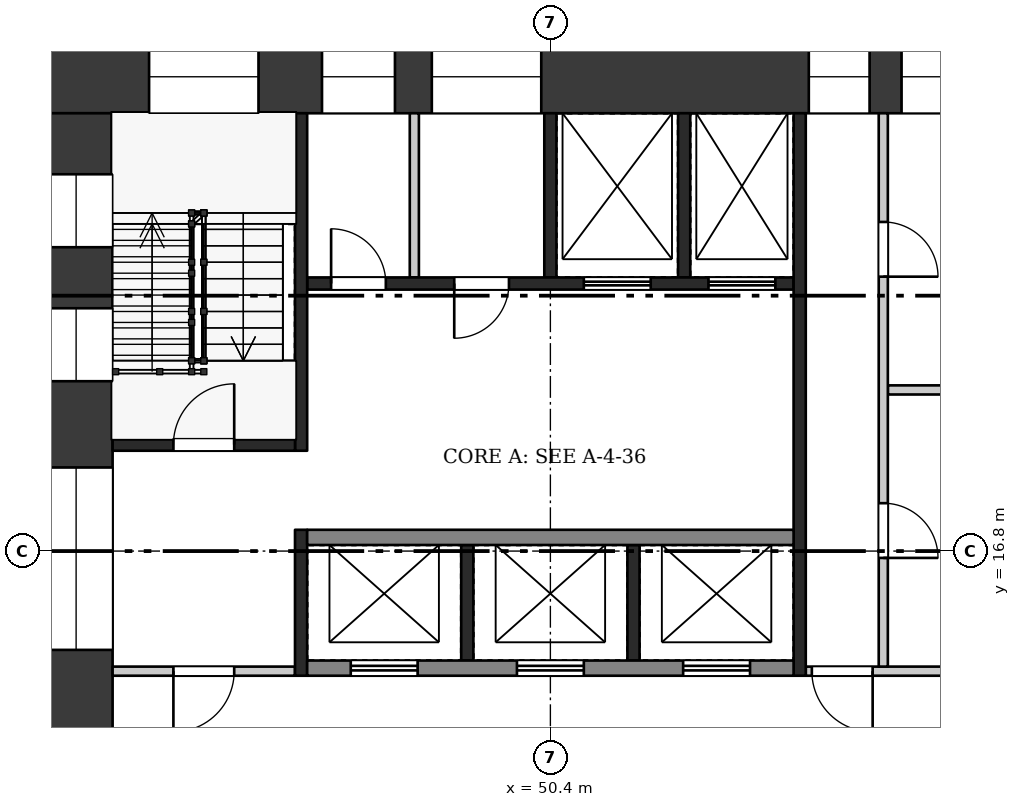
"""IFC4 building model, lengths in metres.
Left out: names, types, materials, properties, quantities, classifications, styles, units other than length and angle.
Written with IfcOpenShell. Run it as: python <this file> out.ifc"""

import sys

from ifc_helpers import new_model, si_unit, direction, frame, frame_2d, origin, origin_2d, place, context, subcontext, project, spatial, rectangle, extrude, element, fill, save


model = new_model("IFC4")
c1 = context("Model", 3, precision=1e-05, world=origin(), true_north=direction((0.0, 1.0)))
c2 = subcontext(c1, "Body", "Model", "MODEL_VIEW")
j1 = project(units=[si_unit("LENGTHUNIT", "METRE"), si_unit("PLANEANGLEUNIT", "RADIAN")], contexts=[c1])
p1 = place(None, origin())
s1 = spatial("IfcSite", under=j1, at=p1, CompositionType="ELEMENT")
p2 = place(p1, origin())
s2 = spatial("IfcBuilding", under=s1, at=p2, CompositionType="ELEMENT")
p3 = place(p2, frame((0.0, 0.0, 277.2)))
s3 = spatial("IfcBuildingStorey", under=s2, at=p3, CompositionType="ELEMENT", Elevation=277.2)
p4 = place(p3, frame((42.0, 24.6, 0.0), z_axis=(0.0, 0.0, 1.0), x_axis=(1.0, 0.0, 0.0)))
e1 = element("IfcWall", 1, at=p4, inside=s3, PredefinedType="SHEAR", context=c2, shape_type="SweptSolid", body=[
    extrude(rectangle(XDim=16.8, YDim=1.2, at=frame_2d((8.4, 0.0))), origin(), (0.0, 0.0, 1.0), 6.58),
])
p5 = place(p4, frame((1.8, 0.0, 0.5)))
e2 = element("IfcOpeningElement", 2, at=p5, cuts=e1, PredefinedType="OPENING", context=c2, shape_type="SweptSolid", body=[
    extrude(rectangle(XDim=1.8, YDim=2.4, at=frame_2d((0.9, 1.2))), frame((0.0, 0.61, 0.0), z_axis=(0.0, -1.0, 0.0), x_axis=(1.0, 0.0, 0.0)), (0.0, 0.0, 1.0), 1.22),
])
p6 = place(p4, frame((4.644, 0.0, 1.6)))
e3 = element("IfcOpeningElement", 3, at=p6, cuts=e1, PredefinedType="OPENING", context=c2, shape_type="SweptSolid", body=[
    extrude(rectangle(XDim=1.2, YDim=1.2, at=frame_2d((0.6, 0.6))), frame((0.0, 0.61, 0.0), z_axis=(0.0, -1.0, 0.0), x_axis=(1.0, 0.0, 0.0)), (0.0, 0.0, 1.0), 1.22),
])
p7 = place(p4, frame((6.45, 0.0, 1.6)))
e4 = element("IfcOpeningElement", 4, at=p7, cuts=e1, PredefinedType="OPENING", context=c2, shape_type="SweptSolid", body=[
    extrude(rectangle(XDim=1.8, YDim=1.2, at=frame_2d((0.9, 0.6))), frame((0.0, 0.61, 0.0), z_axis=(0.0, -1.0, 0.0), x_axis=(1.0, 0.0, 0.0)), (0.0, 0.0, 1.0), 1.22),
])
p8 = place(p4, frame((12.65, 0.0, 0.6)))
e5 = element("IfcOpeningElement", 5, at=p8, cuts=e1, PredefinedType="OPENING", context=c2, shape_type="SweptSolid", body=[
    extrude(rectangle(XDim=1.0, YDim=2.1, at=frame_2d((0.5, 1.05))), frame((0.0, 0.61, 0.0), z_axis=(0.0, -1.0, 0.0), x_axis=(1.0, 0.0, 0.0)), (0.0, 0.0, 1.0), 1.22),
])
p9 = place(p4, frame((14.175, 0.0, 1.6)))
e6 = element("IfcOpeningElement", 6, at=p9, cuts=e1, PredefinedType="OPENING", context=c2, shape_type="SweptSolid", body=[
    extrude(rectangle(XDim=1.2, YDim=1.2, at=frame_2d((0.6, 0.6))), frame((0.0, 0.61, 0.0), z_axis=(0.0, -1.0, 0.0), x_axis=(1.0, 0.0, 0.0)), (0.0, 0.0, 1.0), 1.22),
])
p10 = place(p3, frame((42.6, 9.6, 0.0), z_axis=(0.0, 0.0, 1.0), x_axis=(0.0, 1.0, 0.0)))
e7 = element("IfcWall", 7, at=p10, inside=s3, PredefinedType="SHEAR", context=c2, shape_type="SweptSolid", body=[
    extrude(rectangle(XDim=14.4, YDim=1.2, at=frame_2d((7.2, 0.0))), origin(), (0.0, 0.0, 1.0), 6.58),
])
p11 = place(p10, frame((2.1, 0.0, 0.0)))
e8 = element("IfcOpeningElement", 8, at=p11, cuts=e7, PredefinedType="OPENING", context=c2, shape_type="SweptSolid", body=[
    extrude(rectangle(XDim=1.8, YDim=2.1, at=frame_2d((0.9, 1.05))), frame((0.0, 0.61, 0.0), z_axis=(0.0, -1.0, 0.0), x_axis=(1.0, 0.0, 0.0)), (0.0, 0.0, 1.0), 1.22),
])
p12 = place(p10, frame((5.575, 0.0, 0.6)))
e9 = element("IfcOpeningElement", 9, at=p12, cuts=e7, PredefinedType="OPENING", context=c2, shape_type="SweptSolid", body=[
    extrude(rectangle(XDim=3.0, YDim=2.1, at=frame_2d((1.5, 1.05))), frame((0.0, 0.61, 0.0), z_axis=(0.0, -1.0, 0.0), x_axis=(1.0, 0.0, 0.0)), (0.0, 0.0, 1.0), 1.22),
])
p13 = place(p10, frame((9.993, 0.0, 0.5)))
e10 = element("IfcOpeningElement", 10, at=p13, cuts=e7, PredefinedType="OPENING", context=c2, shape_type="SweptSolid", body=[
    extrude(rectangle(XDim=1.2, YDim=2.4, at=frame_2d((0.6, 1.2))), frame((0.0, 0.61, 0.0), z_axis=(0.0, -1.0, 0.0), x_axis=(1.0, 0.0, 0.0)), (0.0, 0.0, 1.0), 1.22),
])
p14 = place(p10, frame((12.197, 0.0, 0.5)))
e11 = element("IfcOpeningElement", 11, at=p14, cuts=e7, PredefinedType="OPENING", context=c2, shape_type="SweptSolid", body=[
    extrude(rectangle(XDim=1.2, YDim=2.4, at=frame_2d((0.6, 1.2))), frame((0.0, 0.61, 0.0), z_axis=(0.0, -1.0, 0.0), x_axis=(1.0, 0.0, 0.0)), (0.0, 0.0, 1.0), 1.22),
])
for number, where, z_axis, x_axis in (
    (12, (49.033, 15.0, 0.0), (0.0, 0.0, 1.0), (0.0, 1.0, 0.0)),
    (13, (51.767, 15.0, 0.0), (0.0, 0.0, 1.0), (0.0, 1.0, 0.0)),
):
    element("IfcWall", number, at=place(p3, frame(where, z_axis=z_axis, x_axis=x_axis)), inside=s3, PredefinedType="SHEAR", context=c2, shape_type="SweptSolid", body=[
        extrude(rectangle(XDim=1.9, YDim=0.2, at=frame_2d((0.95, 0.0))), origin(), (0.0, 0.0, 1.0), 6.58),
    ])
p15 = place(p3, frame((46.4, 14.875, 0.0), z_axis=(0.0, 0.0, 1.0), x_axis=(1.0, 0.0, 0.0)))
e14 = element("IfcWall", 14, at=p15, inside=s3, PredefinedType="SHEAR", context=c2, shape_type="SweptSolid", body=[
    extrude(rectangle(XDim=8.0, YDim=0.25, at=frame_2d((4.0, 0.0))), origin(), (0.0, 0.0, 1.0), 6.58),
])
p16 = place(p15, frame((0.717, 0.0, 0.0)))
e15 = element("IfcOpeningElement", 15, at=p16, cuts=e14, PredefinedType="OPENING", context=c2, shape_type="SweptSolid", body=[
    extrude(rectangle(XDim=1.1, YDim=2.1, at=frame_2d((0.55, 1.05))), frame((0.0, 0.135, 0.0), z_axis=(0.0, -1.0, 0.0), x_axis=(1.0, 0.0, 0.0)), (0.0, 0.0, 1.0), 0.27),
])
p17 = place(p15, frame((3.45, 0.0, 0.0)))
e16 = element("IfcOpeningElement", 16, at=p17, cuts=e14, PredefinedType="OPENING", context=c2, shape_type="SweptSolid", body=[
    extrude(rectangle(XDim=1.1, YDim=2.1, at=frame_2d((0.55, 1.05))), frame((0.0, 0.135, 0.0), z_axis=(0.0, -1.0, 0.0), x_axis=(1.0, 0.0, 0.0)), (0.0, 0.0, 1.0), 0.27),
])
p18 = place(p15, frame((6.183, 0.0, 0.0)))
e17 = element("IfcOpeningElement", 17, at=p18, cuts=e14, PredefinedType="OPENING", context=c2, shape_type="SweptSolid", body=[
    extrude(rectangle(XDim=1.1, YDim=2.1, at=frame_2d((0.55, 1.05))), frame((0.0, 0.135, 0.0), z_axis=(0.0, -1.0, 0.0), x_axis=(1.0, 0.0, 0.0)), (0.0, 0.0, 1.0), 0.27),
])
p19 = place(p3, frame((46.4, 17.025, 0.0), z_axis=(0.0, 0.0, 1.0), x_axis=(1.0, 0.0, 0.0)))
e18 = element("IfcWall", 18, at=p19, inside=s3, PredefinedType="SHEAR", context=c2, shape_type="SweptSolid", body=[
    extrude(rectangle(XDim=8.0, YDim=0.25, at=frame_2d((4.0, 0.0))), origin(), (0.0, 0.0, 1.0), 6.58),
])
for number, where, z_axis, x_axis in (
    (19, (50.4, 21.3, 0.0), (0.0, 0.0, 1.0), (0.0, 1.0, 0.0)),
    (20, (52.6, 21.3, 0.0), (0.0, 0.0, 1.0), (0.0, 1.0, 0.0)),
):
    element("IfcWall", number, at=place(p3, frame(where, z_axis=z_axis, x_axis=x_axis)), inside=s3, PredefinedType="SHEAR", context=c2, shape_type="SweptSolid", body=[
        extrude(rectangle(XDim=2.7, YDim=0.2, at=frame_2d((1.35, 0.0))), origin(), (0.0, 0.0, 1.0), 6.58),
    ])
p20 = place(p3, frame((48.163, 21.3, 0.0), z_axis=(0.0, 0.0, 1.0), x_axis=(0.0, 1.0, 0.0)))
e21 = element("IfcWall", 21, at=p20, inside=s3, PredefinedType="PARTITIONING", context=c2, shape_type="SweptSolid", body=[
    extrude(rectangle(XDim=2.7, YDim=0.15, at=frame_2d((1.35, 0.0))), origin(), (0.0, 0.0, 1.0), 6.58),
])
p21 = place(p3, frame((46.4, 21.2, 0.0), z_axis=(0.0, 0.0, 1.0), x_axis=(1.0, 0.0, 0.0)))
e22 = element("IfcWall", 22, at=p21, inside=s3, PredefinedType="SHEAR", context=c2, shape_type="SweptSolid", body=[
    extrude(rectangle(XDim=8.0, YDim=0.2, at=frame_2d((4.0, 0.0))), origin(), (0.0, 0.0, 1.0), 6.58),
])
p22 = place(p21, frame((0.394, 0.0, 0.0)))
e23 = element("IfcOpeningElement", 23, at=p22, cuts=e22, PredefinedType="OPENING", context=c2, shape_type="SweptSolid", body=[
    extrude(rectangle(XDim=0.9, YDim=2.1, at=frame_2d((0.45, 1.05))), frame((0.0, 0.11, 0.0), z_axis=(0.0, -1.0, 0.0), x_axis=(1.0, 0.0, 0.0)), (0.0, 0.0, 1.0), 0.22),
])
p23 = place(p21, frame((2.419, 0.0, 0.0)))
e24 = element("IfcOpeningElement", 24, at=p23, cuts=e22, PredefinedType="OPENING", context=c2, shape_type="SweptSolid", body=[
    extrude(rectangle(XDim=0.9, YDim=2.1, at=frame_2d((0.45, 1.05))), frame((0.0, 0.11, 0.0), z_axis=(0.0, -1.0, 0.0), x_axis=(1.0, 0.0, 0.0)), (0.0, 0.0, 1.0), 0.22),
])
p24 = place(p21, frame((4.55, 0.0, 0.0)))
e25 = element("IfcOpeningElement", 25, at=p24, cuts=e22, PredefinedType="OPENING", context=c2, shape_type="SweptSolid", body=[
    extrude(rectangle(XDim=1.1, YDim=2.1, at=frame_2d((0.55, 1.05))), frame((0.0, 0.11, 0.0), z_axis=(0.0, -1.0, 0.0), x_axis=(1.0, 0.0, 0.0)), (0.0, 0.0, 1.0), 0.22),
])
p25 = place(p21, frame((6.6, 0.0, 0.0)))
e26 = element("IfcOpeningElement", 26, at=p25, cuts=e22, PredefinedType="OPENING", context=c2, shape_type="SweptSolid", body=[
    extrude(rectangle(XDim=1.1, YDim=2.1, at=frame_2d((0.55, 1.05))), frame((0.0, 0.11, 0.0), z_axis=(0.0, -1.0, 0.0), x_axis=(1.0, 0.0, 0.0)), (0.0, 0.0, 1.0), 0.22),
])
p26 = place(p3, frame((46.3, 14.75, 0.0), z_axis=(0.0, 0.0, 1.0), x_axis=(0.0, 1.0, 0.0)))
e27 = element("IfcWall", 27, at=p26, inside=s3, PredefinedType="SHEAR", context=c2, shape_type="SweptSolid", body=[
    extrude(rectangle(XDim=2.4, YDim=0.2, at=frame_2d((1.2, 0.0))), origin(), (0.0, 0.0, 1.0), 6.58),
])
p27 = place(p3, frame((46.3, 18.45, 0.0), z_axis=(0.0, 0.0, 1.0), x_axis=(0.0, 1.0, 0.0)))
e28 = element("IfcWall", 28, at=p27, inside=s3, PredefinedType="SHEAR", context=c2, shape_type="SweptSolid", body=[
    extrude(rectangle(XDim=5.55, YDim=0.2, at=frame_2d((2.775, 0.0))), origin(), (0.0, 0.0, 1.0), 6.58),
])
p28 = place(p3, frame((43.2, 14.825, 0.0), z_axis=(0.0, 0.0, 1.0), x_axis=(1.0, 0.0, 0.0)))
e29 = element("IfcWall", 29, at=p28, inside=s3, PredefinedType="PARTITIONING", context=c2, shape_type="SweptSolid", body=[
    extrude(rectangle(XDim=3.0, YDim=0.15, at=frame_2d((1.5, 0.0))), origin(), (0.0, 0.0, 1.0), 6.58),
])
p29 = place(p28, frame((1.0, 0.0, 0.0)))
e30 = element("IfcOpeningElement", 30, at=p29, cuts=e29, PredefinedType="OPENING", context=c2, shape_type="SweptSolid", body=[
    extrude(rectangle(XDim=1.0, YDim=2.1, at=frame_2d((0.5, 1.05))), frame((0.0, 0.085, 0.0), z_axis=(0.0, -1.0, 0.0), x_axis=(1.0, 0.0, 0.0)), (0.0, 0.0, 1.0), 0.17),
])
p30 = place(p3, frame((43.2, 18.55, 0.0), z_axis=(0.0, 0.0, 1.0), x_axis=(1.0, 0.0, 0.0)))
e31 = element("IfcWall", 31, at=p30, inside=s3, PredefinedType="SHEAR", context=c2, shape_type="SweptSolid", body=[
    extrude(rectangle(XDim=3.0, YDim=0.2, at=frame_2d((1.5, 0.0))), origin(), (0.0, 0.0, 1.0), 6.58),
])
p31 = place(p30, frame((1.0, 0.0, 0.0)))
e32 = element("IfcOpeningElement", 32, at=p31, cuts=e31, PredefinedType="OPENING", context=c2, shape_type="SweptSolid", body=[
    extrude(rectangle(XDim=1.0, YDim=2.1, at=frame_2d((0.5, 1.05))), frame((0.0, 0.11, 0.0), z_axis=(0.0, -1.0, 0.0), x_axis=(1.0, 0.0, 0.0)), (0.0, 0.0, 1.0), 0.22),
])
p32 = place(p3, frame((54.5, 14.75, 0.0), z_axis=(0.0, 0.0, 1.0), x_axis=(0.0, 1.0, 0.0)))
e33 = element("IfcWall", 33, at=p32, inside=s3, PredefinedType="SHEAR", context=c2, shape_type="SweptSolid", body=[
    extrude(rectangle(XDim=9.25, YDim=0.2, at=frame_2d((4.625, 0.0))), origin(), (0.0, 0.0, 1.0), 6.58),
])
p33 = place(p3, frame((54.6, 14.825, 0.0), z_axis=(0.0, 0.0, 1.0), x_axis=(1.0, 0.0, 0.0)))
e34 = element("IfcWall", 34, at=p33, inside=s3, PredefinedType="PARTITIONING", context=c2, shape_type="SweptSolid", body=[
    extrude(rectangle(XDim=3.0, YDim=0.15, at=frame_2d((1.5, 0.0))), origin(), (0.0, 0.0, 1.0), 6.58),
])
p34 = place(p33, frame((0.1, 0.0, 0.0)))
e35 = element("IfcOpeningElement", 35, at=p34, cuts=e34, PredefinedType="OPENING", context=c2, shape_type="SweptSolid", body=[
    extrude(rectangle(XDim=1.0, YDim=2.1, at=frame_2d((0.5, 1.05))), frame((0.0, 0.085, 0.0), z_axis=(0.0, -1.0, 0.0), x_axis=(1.0, 0.0, 0.0)), (0.0, 0.0, 1.0), 0.17),
])
p35 = place(p3, frame((55.95, 19.45, 0.0), z_axis=(0.0, 0.0, 1.0), x_axis=(1.0, 0.0, 0.0)))
e36 = element("IfcWall", 36, at=p35, inside=s3, PredefinedType="PARTITIONING", context=c2, shape_type="SweptSolid", body=[
    extrude(rectangle(XDim=1.65, YDim=0.15, at=frame_2d((0.825, 0.0))), origin(), (0.0, 0.0, 1.0), 6.58),
])
p36 = place(p3, frame((55.875, 14.9, 0.0), z_axis=(0.0, 0.0, 1.0), x_axis=(0.0, 1.0, 0.0)))
e37 = element("IfcWall", 37, at=p36, inside=s3, PredefinedType="PARTITIONING", context=c2, shape_type="SweptSolid", body=[
    extrude(rectangle(XDim=9.1, YDim=0.15, at=frame_2d((4.55, 0.0))), origin(), (0.0, 0.0, 1.0), 6.58),
])
p37 = place(p36, frame((1.788, 0.0, 0.0)))
e38 = element("IfcOpeningElement", 38, at=p37, cuts=e37, PredefinedType="OPENING", context=c2, shape_type="SweptSolid", body=[
    extrude(rectangle(XDim=0.9, YDim=2.1, at=frame_2d((0.45, 1.05))), frame((0.0, 0.085, 0.0), z_axis=(0.0, -1.0, 0.0), x_axis=(1.0, 0.0, 0.0)), (0.0, 0.0, 1.0), 0.17),
])
p38 = place(p36, frame((6.413, 0.0, 0.0)))
e39 = element("IfcOpeningElement", 39, at=p38, cuts=e37, PredefinedType="OPENING", context=c2, shape_type="SweptSolid", body=[
    extrude(rectangle(XDim=0.9, YDim=2.1, at=frame_2d((0.45, 1.05))), frame((0.0, 0.085, 0.0), z_axis=(0.0, -1.0, 0.0), x_axis=(1.0, 0.0, 0.0)), (0.0, 0.0, 1.0), 0.17),
])
p39 = place(p16, origin())
e40 = element("IfcDoor", 40, at=p39, inside=s3, OperationType="DOUBLE_DOOR_SLIDING", PredefinedType="DOOR", context=c2, shape_type="SweptSolid", body=[
    extrude(rectangle(XDim=1.1, YDim=2.1, at=frame_2d((0.55, 1.05))), frame((0.0, 0.025, 0.0), z_axis=(0.0, -1.0, 0.0), x_axis=(1.0, 0.0, 0.0)), (0.0, 0.0, 1.0), 0.05),
])
fill(e15, e40)
p40 = place(p17, origin())
e41 = element("IfcDoor", 41, at=p40, inside=s3, OperationType="DOUBLE_DOOR_SLIDING", PredefinedType="DOOR", context=c2, shape_type="SweptSolid", body=[
    extrude(rectangle(XDim=1.1, YDim=2.1, at=frame_2d((0.55, 1.05))), frame((0.0, 0.025, 0.0), z_axis=(0.0, -1.0, 0.0), x_axis=(1.0, 0.0, 0.0)), (0.0, 0.0, 1.0), 0.05),
])
fill(e16, e41)
p41 = place(p18, origin())
e42 = element("IfcDoor", 42, at=p41, inside=s3, OperationType="DOUBLE_DOOR_SLIDING", PredefinedType="DOOR", context=c2, shape_type="SweptSolid", body=[
    extrude(rectangle(XDim=1.1, YDim=2.1, at=frame_2d((0.55, 1.05))), frame((0.0, 0.025, 0.0), z_axis=(0.0, -1.0, 0.0), x_axis=(1.0, 0.0, 0.0)), (0.0, 0.0, 1.0), 0.05),
])
fill(e17, e42)
p42 = place(p22, origin())
e43 = element("IfcDoor", 43, at=p42, inside=s3, OperationType="SINGLE_SWING_LEFT", PredefinedType="DOOR", context=c2, shape_type="SweptSolid", body=[
    extrude(rectangle(XDim=0.9, YDim=2.1, at=frame_2d((0.45, 1.05))), frame((0.0, 0.025, 0.0), z_axis=(0.0, -1.0, 0.0), x_axis=(1.0, 0.0, 0.0)), (0.0, 0.0, 1.0), 0.05),
])
fill(e23, e43)
p43 = place(p23, frame((0.9, 0.0, 0.0), z_axis=(0.0, 0.0, 1.0), x_axis=(-1.0, 0.0, 0.0)))
e44 = element("IfcDoor", 44, at=p43, inside=s3, OperationType="SINGLE_SWING_RIGHT", PredefinedType="DOOR", context=c2, shape_type="SweptSolid", body=[
    extrude(rectangle(XDim=0.9, YDim=2.1, at=frame_2d((0.45, 1.05))), frame((0.0, 0.025, 0.0), z_axis=(0.0, -1.0, 0.0), x_axis=(1.0, 0.0, 0.0)), (0.0, 0.0, 1.0), 0.05),
])
fill(e24, e44)
p44 = place(p24, origin())
e45 = element("IfcDoor", 45, at=p44, inside=s3, OperationType="DOUBLE_DOOR_SLIDING", PredefinedType="DOOR", context=c2, shape_type="SweptSolid", body=[
    extrude(rectangle(XDim=1.1, YDim=2.1, at=frame_2d((0.55, 1.05))), frame((0.0, 0.025, 0.0), z_axis=(0.0, -1.0, 0.0), x_axis=(1.0, 0.0, 0.0)), (0.0, 0.0, 1.0), 0.05),
])
fill(e25, e45)
p45 = place(p25, origin())
e46 = element("IfcDoor", 46, at=p45, inside=s3, OperationType="DOUBLE_DOOR_SLIDING", PredefinedType="DOOR", context=c2, shape_type="SweptSolid", body=[
    extrude(rectangle(XDim=1.1, YDim=2.1, at=frame_2d((0.55, 1.05))), frame((0.0, 0.025, 0.0), z_axis=(0.0, -1.0, 0.0), x_axis=(1.0, 0.0, 0.0)), (0.0, 0.0, 1.0), 0.05),
])
fill(e26, e46)
p46 = place(p29, frame((1.0, 0.0, 0.0), z_axis=(0.0, 0.0, 1.0), x_axis=(-1.0, 0.0, 0.0)))
e47 = element("IfcDoor", 47, at=p46, inside=s3, OperationType="SINGLE_SWING_RIGHT", PredefinedType="DOOR", context=c2, shape_type="SweptSolid", body=[
    extrude(rectangle(XDim=1.0, YDim=2.1, at=frame_2d((0.5, 1.05))), frame((0.0, 0.025, 0.0), z_axis=(0.0, -1.0, 0.0), x_axis=(1.0, 0.0, 0.0)), (0.0, 0.0, 1.0), 0.05),
])
fill(e30, e47)
p47 = place(p31, origin())
e48 = element("IfcDoor", 48, at=p47, inside=s3, OperationType="SINGLE_SWING_RIGHT", PredefinedType="DOOR", context=c2, shape_type="SweptSolid", body=[
    extrude(rectangle(XDim=1.0, YDim=2.1, at=frame_2d((0.5, 1.05))), frame((0.0, 0.025, 0.0), z_axis=(0.0, -1.0, 0.0), x_axis=(1.0, 0.0, 0.0)), (0.0, 0.0, 1.0), 0.05),
])
fill(e32, e48)
p48 = place(p34, frame((1.0, 0.0, 0.0), z_axis=(0.0, 0.0, 1.0), x_axis=(-1.0, 0.0, 0.0)))
e49 = element("IfcDoor", 49, at=p48, inside=s3, OperationType="SINGLE_SWING_LEFT", PredefinedType="DOOR", context=c2, shape_type="SweptSolid", body=[
    extrude(rectangle(XDim=1.0, YDim=2.1, at=frame_2d((0.5, 1.05))), frame((0.0, 0.025, 0.0), z_axis=(0.0, -1.0, 0.0), x_axis=(1.0, 0.0, 0.0)), (0.0, 0.0, 1.0), 0.05),
])
fill(e35, e49)
p49 = place(p37, frame((0.9, 0.0, 0.0), z_axis=(0.0, 0.0, 1.0), x_axis=(-1.0, 0.0, 0.0)))
e50 = element("IfcDoor", 50, at=p49, inside=s3, OperationType="SINGLE_SWING_RIGHT", PredefinedType="DOOR", context=c2, shape_type="SweptSolid", body=[
    extrude(rectangle(XDim=0.9, YDim=2.1, at=frame_2d((0.45, 1.05))), frame((0.0, 0.025, 0.0), z_axis=(0.0, -1.0, 0.0), x_axis=(1.0, 0.0, 0.0)), (0.0, 0.0, 1.0), 0.05),
])
fill(e38, e50)
p50 = place(p38, frame((0.9, 0.0, 0.0), z_axis=(0.0, 0.0, 1.0), x_axis=(-1.0, 0.0, 0.0)))
e51 = element("IfcDoor", 51, at=p50, inside=s3, OperationType="SINGLE_SWING_RIGHT", PredefinedType="DOOR", context=c2, shape_type="SweptSolid", body=[
    extrude(rectangle(XDim=0.9, YDim=2.1, at=frame_2d((0.45, 1.05))), frame((0.0, 0.025, 0.0), z_axis=(0.0, -1.0, 0.0), x_axis=(1.0, 0.0, 0.0)), (0.0, 0.0, 1.0), 0.05),
])
fill(e39, e51)
p51 = place(p5, origin())
e52 = element("IfcWindow", 52, at=p51, inside=s3, PartitioningType="SINGLE_PANEL", PredefinedType="WINDOW", context=c2, shape_type="SweptSolid", body=[
    extrude(rectangle(XDim=1.8, YDim=2.4, at=frame_2d((0.9, 1.2))), frame((0.0, 0.03, 0.0), z_axis=(0.0, -1.0, 0.0), x_axis=(1.0, 0.0, 0.0)), (0.0, 0.0, 1.0), 0.06),
])
fill(e2, e52)
p52 = place(p6, origin())
e53 = element("IfcWindow", 53, at=p52, inside=s3, PartitioningType="SINGLE_PANEL", PredefinedType="WINDOW", context=c2, shape_type="SweptSolid", body=[
    extrude(rectangle(XDim=1.2, YDim=1.2, at=frame_2d((0.6, 0.6))), frame((0.0, 0.03, 0.0), z_axis=(0.0, -1.0, 0.0), x_axis=(1.0, 0.0, 0.0)), (0.0, 0.0, 1.0), 0.06),
])
fill(e3, e53)
p53 = place(p7, origin())
e54 = element("IfcWindow", 54, at=p53, inside=s3, PartitioningType="SINGLE_PANEL", PredefinedType="WINDOW", context=c2, shape_type="SweptSolid", body=[
    extrude(rectangle(XDim=1.8, YDim=1.2, at=frame_2d((0.9, 0.6))), frame((0.0, 0.03, 0.0), z_axis=(0.0, -1.0, 0.0), x_axis=(1.0, 0.0, 0.0)), (0.0, 0.0, 1.0), 0.06),
])
fill(e4, e54)
p54 = place(p8, origin())
e55 = element("IfcWindow", 55, at=p54, inside=s3, PartitioningType="SINGLE_PANEL", PredefinedType="WINDOW", context=c2, shape_type="SweptSolid", body=[
    extrude(rectangle(XDim=1.0, YDim=2.1, at=frame_2d((0.5, 1.05))), frame((0.0, 0.03, 0.0), z_axis=(0.0, -1.0, 0.0), x_axis=(1.0, 0.0, 0.0)), (0.0, 0.0, 1.0), 0.06),
])
fill(e5, e55)
p55 = place(p9, origin())
e56 = element("IfcWindow", 56, at=p55, inside=s3, PartitioningType="SINGLE_PANEL", PredefinedType="WINDOW", context=c2, shape_type="SweptSolid", body=[
    extrude(rectangle(XDim=1.2, YDim=1.2, at=frame_2d((0.6, 0.6))), frame((0.0, 0.03, 0.0), z_axis=(0.0, -1.0, 0.0), x_axis=(1.0, 0.0, 0.0)), (0.0, 0.0, 1.0), 0.06),
])
fill(e6, e56)
p56 = place(p12, origin())
e57 = element("IfcWindow", 57, at=p56, inside=s3, PartitioningType="SINGLE_PANEL", PredefinedType="WINDOW", context=c2, shape_type="SweptSolid", body=[
    extrude(rectangle(XDim=3.0, YDim=2.1, at=frame_2d((1.5, 1.05))), frame((0.0, 0.03, 0.0), z_axis=(0.0, -1.0, 0.0), x_axis=(1.0, 0.0, 0.0)), (0.0, 0.0, 1.0), 0.06),
])
fill(e9, e57)
p57 = place(p13, origin())
e58 = element("IfcWindow", 58, at=p57, inside=s3, PartitioningType="SINGLE_PANEL", PredefinedType="WINDOW", context=c2, shape_type="SweptSolid", body=[
    extrude(rectangle(XDim=1.2, YDim=2.4, at=frame_2d((0.6, 1.2))), frame((0.0, 0.03, 0.0), z_axis=(0.0, -1.0, 0.0), x_axis=(1.0, 0.0, 0.0)), (0.0, 0.0, 1.0), 0.06),
])
fill(e10, e58)
p58 = place(p14, origin())
e59 = element("IfcWindow", 59, at=p58, inside=s3, PartitioningType="SINGLE_PANEL", PredefinedType="WINDOW", context=c2, shape_type="SweptSolid", body=[
    extrude(rectangle(XDim=1.2, YDim=2.4, at=frame_2d((0.6, 1.2))), frame((0.0, 0.03, 0.0), z_axis=(0.0, -1.0, 0.0), x_axis=(1.0, 0.0, 0.0)), (0.0, 0.0, 1.0), 0.06),
])
fill(e11, e59)
p59 = place(p2, frame((0.0, 0.0, 287.45)))
p60 = place(p59, frame((0.0, 0.0, -0.25)))
p61 = place(p60, frame((50.4, 15.95, 0.0)))
p62 = place(p61, frame((0.0, 0.0, 0.2)))
e60 = element("IfcWindow", 60, at=p62, inside=s3, PartitioningType="SINGLE_PANEL", PredefinedType="SKYLIGHT", context=c2, shape_type="SweptSolid", body=[
    extrude(rectangle(XDim=0.9, YDim=0.9, at=origin_2d()), origin(), (0.0, 0.0, 1.0), 0.05),
])
p63 = place(p59, frame((0.0, 0.0, 1.95)))
p64 = place(p63, frame((53.55, 22.65, 0.0)))
p65 = place(p64, frame((0.0, 0.0, 0.2)))
e61 = element("IfcWindow", 61, at=p65, inside=s3, PartitioningType="SINGLE_PANEL", PredefinedType="SKYLIGHT", context=c2, shape_type="SweptSolid", body=[
    extrude(rectangle(XDim=0.9, YDim=0.9, at=origin_2d()), origin(), (0.0, 0.0, 1.0), 0.05),
])
save(model, sys.argv[1])
